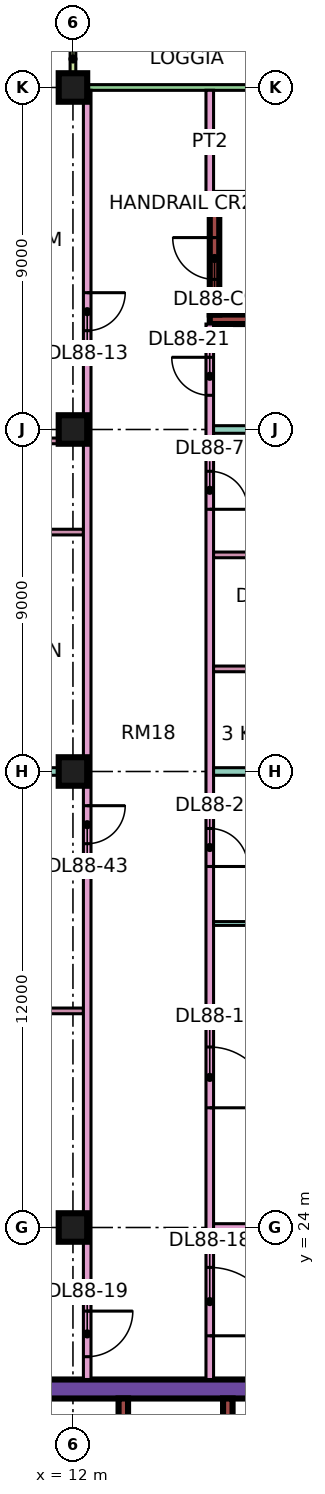
"""IFC4 building model, lengths in metres.
Left out: names, types, materials, properties, quantities, classifications, styles, units other than length and angle.
Written with IfcOpenShell. Run it as: python <this file> out.ifc"""

import sys

from ifc_helpers import new_model, si_unit, direction, frame, frame_2d, origin, origin_2d, place, context, subcontext, project, spatial, rectangle, extrude, element, fill, save


model = new_model("IFC4")
c1 = context("Model", 3, precision=1e-05, world=origin(), true_north=direction((0.0, 1.0)))
c2 = subcontext(c1, "Body", "Model", "MODEL_VIEW")
j1 = project(units=[si_unit("LENGTHUNIT", "METRE"), si_unit("PLANEANGLEUNIT", "RADIAN")], contexts=[c1])
p1 = place(None, origin())
s1 = spatial("IfcSite", under=j1, at=p1, CompositionType="ELEMENT")
p2 = place(p1, origin())
s2 = spatial("IfcBuilding", under=s1, at=p2, CompositionType="ELEMENT")
p3 = place(p2, frame((0.0, 0.0, 376.4)))
s3 = spatial("IfcBuildingStorey", under=s2, at=p3, CompositionType="ELEMENT", Elevation=376.4)
for number, where, z_axis, x_axis in (
    (1, (12.0, 24.0, 0.0), (0.0, 0.0, 1.0), (1.0, 0.0, 0.0)),
    (2, (12.0, 36.0, 0.0), (0.0, 0.0, 1.0), (1.0, 0.0, 0.0)),
    (3, (12.0, 45.0, 0.0), (0.0, 0.0, 1.0), (1.0, 0.0, 0.0)),
    (4, (12.0, 54.0, 0.0), (0.0, 0.0, 1.0), (1.0, 0.0, 0.0)),
):
    element("IfcColumn", number, at=place(p3, frame(where, z_axis=z_axis, x_axis=x_axis)), inside=s3, PredefinedType="COLUMN", context=c2, shape_type="SweptSolid", body=[
        extrude(rectangle(XDim=0.75, YDim=0.75, at=origin_2d()), origin(), (0.0, 0.0, 1.0), 3.75),
    ])
p4 = place(p3, frame((9.0, 19.75, 0.0), z_axis=(0.0, 0.0, 1.0), x_axis=(1.0, 0.0, 0.0)))
e5 = element("IfcWall", 5, at=p4, inside=s3, PredefinedType="SHEAR", context=c2, shape_type="SweptSolid", body=[
    extrude(rectangle(XDim=25.0, YDim=0.5, at=frame_2d((12.5, 0.0))), origin(), (0.0, 0.0, 1.0), 3.75),
])
p5 = place(p4, frame((19.1, 0.0, 0.0)))
e6 = element("IfcOpeningElement", 6, at=p5, cuts=e5, PredefinedType="OPENING", context=c2, shape_type="SweptSolid", body=[
    extrude(rectangle(XDim=1.8, YDim=2.4, at=frame_2d((0.9, 1.2))), frame((0.0, 0.26, 0.0), z_axis=(0.0, -1.0, 0.0), x_axis=(1.0, 0.0, 0.0)), (0.0, 0.0, 1.0), 0.52),
])
p6 = place(p3, frame((13.325, 7.5, 0.0), z_axis=(0.0, 0.0, 1.0), x_axis=(0.0, 1.0, 0.0)))
e7 = element("IfcWall", 7, at=p6, inside=s3, PredefinedType="SHEAR", context=c2, shape_type="SweptSolid", body=[
    extrude(rectangle(XDim=12.0, YDim=0.25, at=frame_2d((6.0, 0.0))), origin(), (0.0, 0.0, 1.0), 3.75),
])
p7 = place(p3, frame((16.075, 15.8, 0.0), z_axis=(0.0, 0.0, 1.0), x_axis=(0.0, 1.0, 0.0)))
e8 = element("IfcWall", 8, at=p7, inside=s3, PredefinedType="SHEAR", context=c2, shape_type="SweptSolid", body=[
    extrude(rectangle(XDim=3.7, YDim=0.25, at=frame_2d((1.85, 0.0))), origin(), (0.0, 0.0, 1.0), 3.75),
])
for number, where, z_axis, x_axis in (
    (9, (15.6, 47.9, 0.0), (0.0, 0.0, 1.0), (1.0, 0.0, 0.0)),
    (10, (15.6, 51.1, 0.0), (0.0, 0.0, 1.0), (1.0, 0.0, 0.0)),
):
    element("IfcWall", number, at=place(p3, frame(where, z_axis=z_axis, x_axis=x_axis)), inside=s3, PredefinedType="SHEAR", context=c2, shape_type="SweptSolid", body=[
        extrude(rectangle(XDim=7.0, YDim=0.25, at=frame_2d((3.5, 0.0))), origin(), (0.0, 0.0, 1.0), 3.75),
    ])
p8 = place(p3, frame((15.725, 48.025, 0.0), z_axis=(0.0, 0.0, 1.0), x_axis=(0.0, 1.0, 0.0)))
e11 = element("IfcWall", 11, at=p8, inside=s3, PredefinedType="SHEAR", context=c2, shape_type="SweptSolid", body=[
    extrude(rectangle(XDim=2.95, YDim=0.25, at=frame_2d((1.475, 0.0))), origin(), (0.0, 0.0, 1.0), 3.75),
])
p9 = place(p8, frame((0.925, 0.0, 0.0)))
e12 = element("IfcOpeningElement", 12, at=p9, cuts=e11, PredefinedType="OPENING", context=c2, shape_type="SweptSolid", body=[
    extrude(rectangle(XDim=1.1, YDim=2.2, at=frame_2d((0.55, 1.1))), frame((0.0, 0.135, 0.0), z_axis=(0.0, -1.0, 0.0), x_axis=(1.0, 0.0, 0.0)), (0.0, 0.0, 1.0), 0.27),
])
p10 = place(p3, frame((22.425, 54.0, 0.0), z_axis=(0.0, 0.0, 1.0), x_axis=(-1.0, 0.0, 0.0)))
e13 = element("IfcWall", 13, at=p10, inside=s3, PredefinedType="SOLIDWALL", context=c2, shape_type="SweptSolid", body=[
    extrude(rectangle(XDim=10.35, YDim=0.15, at=frame_2d((5.175, 0.0))), origin(), (0.0, 0.0, 1.0), 3.35),
])
p11 = place(p10, frame((1.012, 0.0, 0.45)))
e14 = element("IfcOpeningElement", 14, at=p11, cuts=e13, PredefinedType="OPENING", context=c2, shape_type="SweptSolid", body=[
    extrude(rectangle(XDim=4.8, YDim=2.4, at=frame_2d((2.4, 1.2))), frame((0.0, 0.085, 0.0), z_axis=(0.0, -1.0, 0.0), x_axis=(1.0, 0.0, 0.0)), (0.0, 0.0, 1.0), 0.17),
])
p12 = place(p3, frame((12.0, 55.5, 0.0), z_axis=(0.0, 0.0, 1.0), x_axis=(0.0, -1.0, 0.0)))
e15 = element("IfcWall", 15, at=p12, inside=s3, PredefinedType="SOLIDWALL", context=c2, shape_type="SweptSolid", body=[
    extrude(rectangle(XDim=1.5, YDim=0.15, at=frame_2d((0.75, 0.0))), origin(), (0.0, 0.0, 1.0), 3.35),
])
p13 = place(p3, frame((0.0, 36.0, 0.0), z_axis=(0.0, 0.0, 1.0), x_axis=(1.0, 0.0, 0.0)))
e16 = element("IfcWall", 16, at=p13, inside=s3, PredefinedType="PARTITIONING", context=c2, shape_type="SweptSolid", body=[
    extrude(rectangle(XDim=12.275, YDim=0.2, at=frame_2d((6.137, 0.0))), origin(), (0.0, 0.0, 1.0), 3.35),
])
p14 = place(p3, frame((0.074, 22.4, 0.0), z_axis=(0.0, 0.0, 1.0), x_axis=(1.0, 0.0, 0.0)))
e17 = element("IfcWall", 17, at=p14, inside=s3, PredefinedType="PARTITIONING", context=c2, shape_type="SweptSolid", body=[
    extrude(rectangle(XDim=12.201, YDim=0.2, at=frame_2d((6.101, 0.0))), origin(), (0.0, 0.0, 1.0), 3.35),
])
p15 = place(p3, frame((7.05, 42.3, 0.0), z_axis=(0.0, 0.0, 1.0), x_axis=(1.0, 0.0, 0.0)))
e18 = element("IfcWall", 18, at=p15, inside=s3, PredefinedType="PARTITIONING", context=c2, shape_type="SweptSolid", body=[
    extrude(rectangle(XDim=5.225, YDim=0.15, at=frame_2d((2.612, 0.0))), origin(), (0.0, 0.0, 1.0), 3.35),
])
p16 = place(p3, frame((7.05, 44.7, 0.0), z_axis=(0.0, 0.0, 1.0), x_axis=(1.0, 0.0, 0.0)))
e19 = element("IfcWall", 19, at=p16, inside=s3, PredefinedType="PARTITIONING", context=c2, shape_type="SweptSolid", body=[
    extrude(rectangle(XDim=5.225, YDim=0.15, at=frame_2d((2.612, 0.0))), origin(), (0.0, 0.0, 1.0), 3.35),
])
p17 = place(p16, frame((2.175, 0.0, 0.0)))
e20 = element("IfcOpeningElement", 20, at=p17, cuts=e19, PredefinedType="OPENING", context=c2, shape_type="SweptSolid", body=[
    extrude(rectangle(XDim=0.8, YDim=2.1, at=frame_2d((0.4, 1.05))), frame((0.0, 0.085, 0.0), z_axis=(0.0, -1.0, 0.0), x_axis=(1.0, 0.0, 0.0)), (0.0, 0.0, 1.0), 0.17),
])
for number, where, z_axis, x_axis in (
    (21, (7.65, 29.7, 0.0), (0.0, 0.0, 1.0), (1.0, 0.0, 0.0)),
    (22, (7.65, 33.3, 0.0), (0.0, 0.0, 1.0), (1.0, 0.0, 0.0)),
):
    element("IfcWall", number, at=place(p3, frame(where, z_axis=z_axis, x_axis=x_axis)), inside=s3, PredefinedType="PARTITIONING", context=c2, shape_type="SweptSolid", body=[
        extrude(rectangle(XDim=4.625, YDim=0.15, at=frame_2d((2.312, 0.0))), origin(), (0.0, 0.0, 1.0), 3.35),
    ])
p18 = place(p3, frame((12.375, 20.0, 0.0), z_axis=(0.0, 0.0, 1.0), x_axis=(0.0, 1.0, 0.0)))
e23 = element("IfcWall", 23, at=p18, inside=s3, PredefinedType="PARTITIONING", context=c2, shape_type="SweptSolid", body=[
    extrude(rectangle(XDim=33.926, YDim=0.2, at=frame_2d((16.963, 0.0))), origin(), (0.0, 0.0, 1.0), 3.35),
])
p19 = place(p18, frame((27.6, 0.0, 0.0)))
e24 = element("IfcOpeningElement", 24, at=p19, cuts=e23, PredefinedType="OPENING", context=c2, shape_type="SweptSolid", body=[
    extrude(rectangle(XDim=1.0, YDim=2.1, at=frame_2d((0.5, 1.05))), frame((0.0, 0.11, 0.0), z_axis=(0.0, -1.0, 0.0), x_axis=(1.0, 0.0, 0.0)), (0.0, 0.0, 1.0), 0.22),
])
p20 = place(p18, frame((0.6, 0.0, 0.0)))
e25 = element("IfcOpeningElement", 25, at=p20, cuts=e23, PredefinedType="OPENING", context=c2, shape_type="SweptSolid", body=[
    extrude(rectangle(XDim=1.2, YDim=2.1, at=frame_2d((0.6, 1.05))), frame((0.0, 0.11, 0.0), z_axis=(0.0, -1.0, 0.0), x_axis=(1.0, 0.0, 0.0)), (0.0, 0.0, 1.0), 0.22),
])
p21 = place(p18, frame((14.1, 0.0, 0.0)))
e26 = element("IfcOpeningElement", 26, at=p21, cuts=e23, PredefinedType="OPENING", context=c2, shape_type="SweptSolid", body=[
    extrude(rectangle(XDim=1.0, YDim=2.1, at=frame_2d((0.5, 1.05))), frame((0.0, 0.11, 0.0), z_axis=(0.0, -1.0, 0.0), x_axis=(1.0, 0.0, 0.0)), (0.0, 0.0, 1.0), 0.22),
])
p22 = place(p3, frame((15.6, 20.0, 0.0), z_axis=(0.0, 0.0, 1.0), x_axis=(0.0, 1.0, 0.0)))
e27 = element("IfcWall", 27, at=p22, inside=s3, PredefinedType="PARTITIONING", context=c2, shape_type="SweptSolid", body=[
    extrude(rectangle(XDim=27.775, YDim=0.2, at=frame_2d((13.887, 0.0))), origin(), (0.0, 0.0, 1.0), 3.35),
])
p23 = place(p22, frame((7.15, 0.0, 0.0)))
e28 = element("IfcOpeningElement", 28, at=p23, cuts=e27, PredefinedType="OPENING", context=c2, shape_type="SweptSolid", body=[
    extrude(rectangle(XDim=1.6, YDim=2.1, at=frame_2d((0.8, 1.05))), frame((0.0, 0.11, 0.0), z_axis=(0.0, -1.0, 0.0), x_axis=(1.0, 0.0, 0.0)), (0.0, 0.0, 1.0), 0.22),
])
p24 = place(p22, frame((13.5, 0.0, 0.0)))
e29 = element("IfcOpeningElement", 29, at=p24, cuts=e27, PredefinedType="OPENING", context=c2, shape_type="SweptSolid", body=[
    extrude(rectangle(XDim=1.0, YDim=2.1, at=frame_2d((0.5, 1.05))), frame((0.0, 0.11, 0.0), z_axis=(0.0, -1.0, 0.0), x_axis=(1.0, 0.0, 0.0)), (0.0, 0.0, 1.0), 0.22),
])
p25 = place(p22, frame((22.9, 0.0, 0.0)))
e30 = element("IfcOpeningElement", 30, at=p25, cuts=e27, PredefinedType="OPENING", context=c2, shape_type="SweptSolid", body=[
    extrude(rectangle(XDim=1.0, YDim=2.1, at=frame_2d((0.5, 1.05))), frame((0.0, 0.11, 0.0), z_axis=(0.0, -1.0, 0.0), x_axis=(1.0, 0.0, 0.0)), (0.0, 0.0, 1.0), 0.22),
])
p26 = place(p22, frame((1.15, 0.0, 0.0)))
e31 = element("IfcOpeningElement", 31, at=p26, cuts=e27, PredefinedType="OPENING", context=c2, shape_type="SweptSolid", body=[
    extrude(rectangle(XDim=1.8, YDim=2.1, at=frame_2d((0.9, 1.05))), frame((0.0, 0.11, 0.0), z_axis=(0.0, -1.0, 0.0), x_axis=(1.0, 0.0, 0.0)), (0.0, 0.0, 1.0), 0.22),
])
p27 = place(p22, frame((25.9, 0.0, 0.0)))
e32 = element("IfcOpeningElement", 32, at=p27, cuts=e27, PredefinedType="OPENING", context=c2, shape_type="SweptSolid", body=[
    extrude(rectangle(XDim=1.0, YDim=2.1, at=frame_2d((0.5, 1.05))), frame((0.0, 0.11, 0.0), z_axis=(0.0, -1.0, 0.0), x_axis=(1.0, 0.0, 0.0)), (0.0, 0.0, 1.0), 0.22),
])
p28 = place(p3, frame((15.6, 51.225, 0.0), z_axis=(0.0, 0.0, 1.0), x_axis=(0.0, 1.0, 0.0)))
e33 = element("IfcWall", 33, at=p28, inside=s3, PredefinedType="PARTITIONING", context=c2, shape_type="SweptSolid", body=[
    extrude(rectangle(XDim=2.701, YDim=0.2, at=frame_2d((1.351, 0.0))), origin(), (0.0, 0.0, 1.0), 3.35),
])
p29 = place(p3, frame((15.7, 24.0, 0.0), z_axis=(0.0, 0.0, 1.0), x_axis=(1.0, 0.0, 0.0)))
e34 = element("IfcWall", 34, at=p29, inside=s3, PredefinedType="PARTITIONING", context=c2, shape_type="SweptSolid", body=[
    extrude(rectangle(XDim=5.8, YDim=0.2, at=frame_2d((2.9, 0.0))), origin(), (0.0, 0.0, 1.0), 3.35),
])
p30 = place(p3, frame((15.7, 32.0, 0.0), z_axis=(0.0, 0.0, 1.0), x_axis=(1.0, 0.0, 0.0)))
e35 = element("IfcWall", 35, at=p30, inside=s3, PredefinedType="PARTITIONING", context=c2, shape_type="SweptSolid", body=[
    extrude(rectangle(XDim=5.8, YDim=0.1, at=frame_2d((2.9, 0.0))), origin(), (0.0, 0.0, 1.0), 3.35),
])
p31 = place(p3, frame((15.7, 36.0, 0.0), z_axis=(0.0, 0.0, 1.0), x_axis=(1.0, 0.0, 0.0)))
e36 = element("IfcWall", 36, at=p31, inside=s3, PredefinedType="PARTITIONING", context=c2, shape_type="SweptSolid", body=[
    extrude(rectangle(XDim=8.3, YDim=0.2, at=frame_2d((4.15, 0.0))), origin(), (0.0, 0.0, 1.0), 3.35),
])
p32 = place(p3, frame((15.7, 38.7, 0.0), z_axis=(0.0, 0.0, 1.0), x_axis=(1.0, 0.0, 0.0)))
e37 = element("IfcWall", 37, at=p32, inside=s3, PredefinedType="PARTITIONING", context=c2, shape_type="SweptSolid", body=[
    extrude(rectangle(XDim=3.125, YDim=0.15, at=frame_2d((1.562, 0.0))), origin(), (0.0, 0.0, 1.0), 3.35),
])
p33 = place(p3, frame((15.7, 41.7, 0.0), z_axis=(0.0, 0.0, 1.0), x_axis=(1.0, 0.0, 0.0)))
e38 = element("IfcWall", 38, at=p33, inside=s3, PredefinedType="PARTITIONING", context=c2, shape_type="SweptSolid", body=[
    extrude(rectangle(XDim=3.125, YDim=0.15, at=frame_2d((1.562, 0.0))), origin(), (0.0, 0.0, 1.0), 3.35),
])
p34 = place(p33, frame((1.1, 0.0, 0.0)))
e39 = element("IfcOpeningElement", 39, at=p34, cuts=e38, PredefinedType="OPENING", context=c2, shape_type="SweptSolid", body=[
    extrude(rectangle(XDim=0.8, YDim=2.1, at=frame_2d((0.4, 1.05))), frame((0.0, 0.085, 0.0), z_axis=(0.0, -1.0, 0.0), x_axis=(1.0, 0.0, 0.0)), (0.0, 0.0, 1.0), 0.17),
])
p35 = place(p3, frame((15.7, 45.0, 0.0), z_axis=(0.0, 0.0, 1.0), x_axis=(1.0, 0.0, 0.0)))
e40 = element("IfcWall", 40, at=p35, inside=s3, PredefinedType="PARTITIONING", context=c2, shape_type="SweptSolid", body=[
    extrude(rectangle(XDim=8.226, YDim=0.2, at=frame_2d((4.113, 0.0))), origin(), (0.0, 0.0, 1.0), 3.35),
])
p36 = place(p9, frame((1.1, 0.0, 0.0), z_axis=(0.0, 0.0, 1.0), x_axis=(-1.0, 0.0, 0.0)))
e41 = element("IfcDoor", 41, at=p36, inside=s3, OperationType="SINGLE_SWING_RIGHT", PredefinedType="DOOR", context=c2, shape_type="SweptSolid", body=[
    extrude(rectangle(XDim=1.1, YDim=2.2, at=frame_2d((0.55, 1.1))), frame((0.0, 0.025, 0.0), z_axis=(0.0, -1.0, 0.0), x_axis=(1.0, 0.0, 0.0)), (0.0, 0.0, 1.0), 0.05),
])
fill(e12, e41)
p37 = place(p23, frame((1.6, 0.0, 0.0), z_axis=(0.0, 0.0, 1.0), x_axis=(-1.0, 0.0, 0.0)))
e42 = element("IfcDoor", 42, at=p37, inside=s3, OperationType="DOUBLE_DOOR_SINGLE_SWING", PredefinedType="DOOR", context=c2, shape_type="SweptSolid", body=[
    extrude(rectangle(XDim=1.6, YDim=2.1, at=frame_2d((0.8, 1.05))), frame((0.0, 0.025, 0.0), z_axis=(0.0, -1.0, 0.0), x_axis=(1.0, 0.0, 0.0)), (0.0, 0.0, 1.0), 0.05),
])
fill(e28, e42)
p38 = place(p24, frame((1.0, 0.0, 0.0), z_axis=(0.0, 0.0, 1.0), x_axis=(-1.0, 0.0, 0.0)))
e43 = element("IfcDoor", 43, at=p38, inside=s3, OperationType="SINGLE_SWING_LEFT", PredefinedType="DOOR", context=c2, shape_type="SweptSolid", body=[
    extrude(rectangle(XDim=1.0, YDim=2.1, at=frame_2d((0.5, 1.05))), frame((0.0, 0.025, 0.0), z_axis=(0.0, -1.0, 0.0), x_axis=(1.0, 0.0, 0.0)), (0.0, 0.0, 1.0), 0.05),
])
fill(e29, e43)
p39 = place(p25, frame((1.0, 0.0, 0.0), z_axis=(0.0, 0.0, 1.0), x_axis=(-1.0, 0.0, 0.0)))
e44 = element("IfcDoor", 44, at=p39, inside=s3, OperationType="SINGLE_SWING_LEFT", PredefinedType="DOOR", context=c2, shape_type="SweptSolid", body=[
    extrude(rectangle(XDim=1.0, YDim=2.1, at=frame_2d((0.5, 1.05))), frame((0.0, 0.025, 0.0), z_axis=(0.0, -1.0, 0.0), x_axis=(1.0, 0.0, 0.0)), (0.0, 0.0, 1.0), 0.05),
])
fill(e30, e44)
p40 = place(p19, origin())
e45 = element("IfcDoor", 45, at=p40, inside=s3, OperationType="SINGLE_SWING_RIGHT", PredefinedType="DOOR", context=c2, shape_type="SweptSolid", body=[
    extrude(rectangle(XDim=1.0, YDim=2.1, at=frame_2d((0.5, 1.05))), frame((0.0, 0.025, 0.0), z_axis=(0.0, -1.0, 0.0), x_axis=(1.0, 0.0, 0.0)), (0.0, 0.0, 1.0), 0.05),
])
fill(e24, e45)
p41 = place(p26, frame((1.8, 0.0, 0.0), z_axis=(0.0, 0.0, 1.0), x_axis=(-1.0, 0.0, 0.0)))
e46 = element("IfcDoor", 46, at=p41, inside=s3, OperationType="DOUBLE_DOOR_SINGLE_SWING", PredefinedType="DOOR", context=c2, shape_type="SweptSolid", body=[
    extrude(rectangle(XDim=1.8, YDim=2.1, at=frame_2d((0.9, 1.05))), frame((0.0, 0.025, 0.0), z_axis=(0.0, -1.0, 0.0), x_axis=(1.0, 0.0, 0.0)), (0.0, 0.0, 1.0), 0.05),
])
fill(e31, e46)
p42 = place(p20, origin())
e47 = element("IfcDoor", 47, at=p42, inside=s3, OperationType="SINGLE_SWING_RIGHT", PredefinedType="DOOR", context=c2, shape_type="SweptSolid", body=[
    extrude(rectangle(XDim=1.2, YDim=2.1, at=frame_2d((0.6, 1.05))), frame((0.0, 0.025, 0.0), z_axis=(0.0, -1.0, 0.0), x_axis=(1.0, 0.0, 0.0)), (0.0, 0.0, 1.0), 0.05),
])
fill(e25, e47)
p43 = place(p27, frame((1.0, 0.0, 0.0), z_axis=(0.0, 0.0, 1.0), x_axis=(-1.0, 0.0, 0.0)))
e48 = element("IfcDoor", 48, at=p43, inside=s3, OperationType="SINGLE_SWING_RIGHT", PredefinedType="DOOR", context=c2, shape_type="SweptSolid", body=[
    extrude(rectangle(XDim=1.0, YDim=2.1, at=frame_2d((0.5, 1.05))), frame((0.0, 0.025, 0.0), z_axis=(0.0, -1.0, 0.0), x_axis=(1.0, 0.0, 0.0)), (0.0, 0.0, 1.0), 0.05),
])
fill(e32, e48)
p44 = place(p21, origin())
e49 = element("IfcDoor", 49, at=p44, inside=s3, OperationType="SINGLE_SWING_RIGHT", PredefinedType="DOOR", context=c2, shape_type="SweptSolid", body=[
    extrude(rectangle(XDim=1.0, YDim=2.1, at=frame_2d((0.5, 1.05))), frame((0.0, 0.025, 0.0), z_axis=(0.0, -1.0, 0.0), x_axis=(1.0, 0.0, 0.0)), (0.0, 0.0, 1.0), 0.05),
])
fill(e26, e49)
save(model, sys.argv[1])
